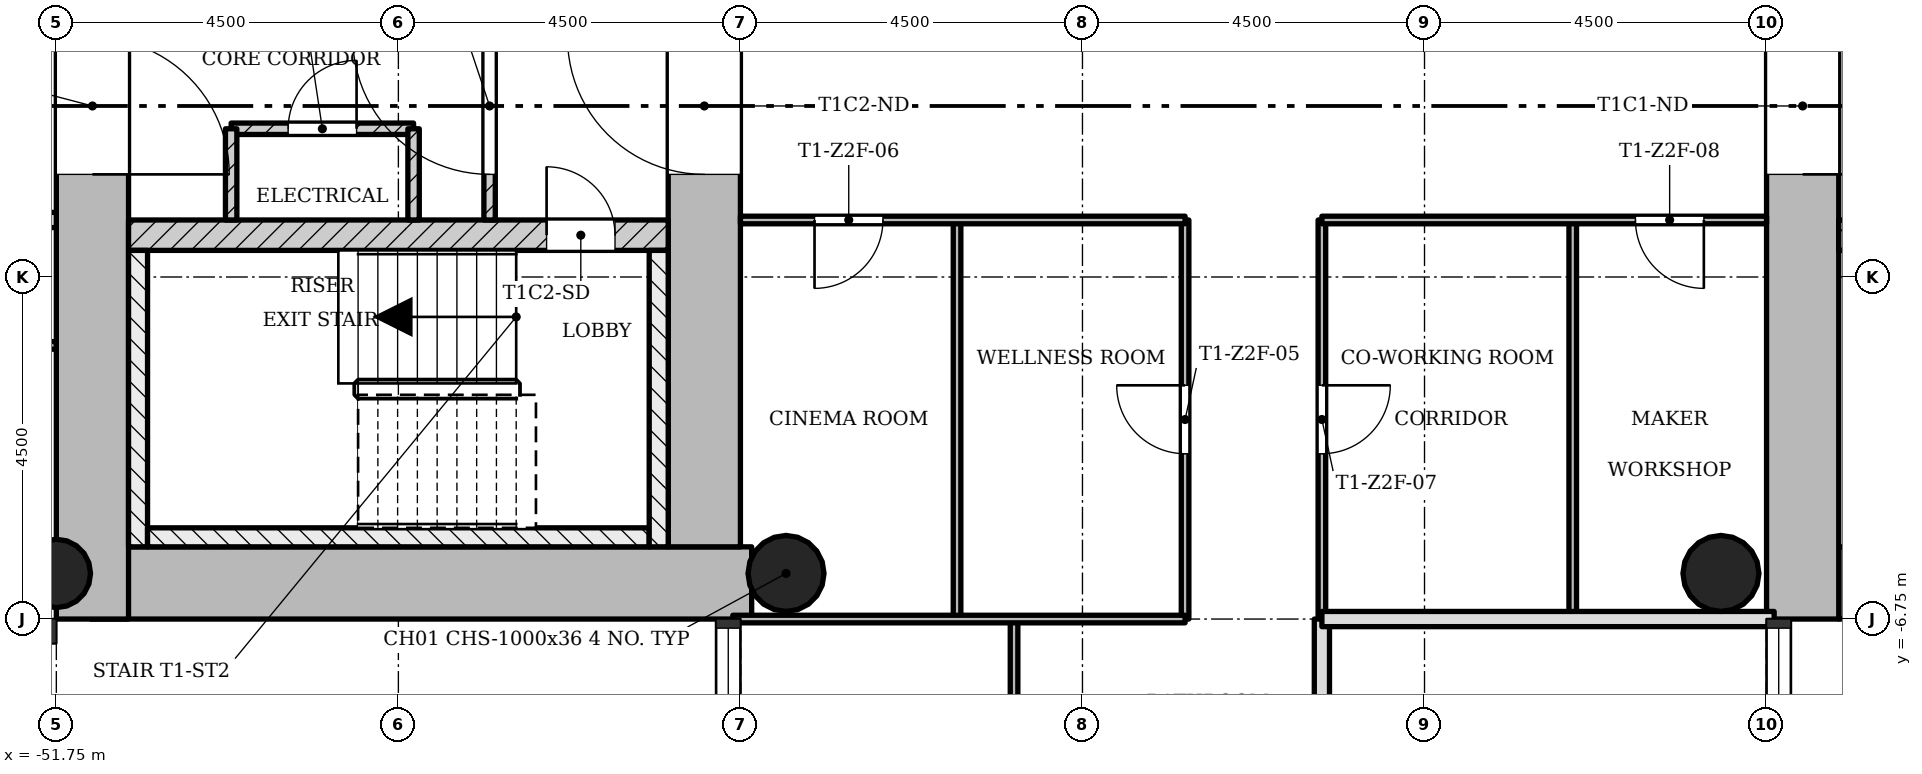
"""IFC4 building model, lengths in metres.
Left out: names, types, materials, properties, quantities, classifications, styles, units other than length and angle.
Written with IfcOpenShell. Run it as: python <this file> out.ifc"""

import sys

from ifc_helpers import new_model, si_unit, direction, frame, frame_2d, origin, origin_2d, place, context, subcontext, project, spatial, rectangle, hollow_circle, extrude, element, fill, save


model = new_model("IFC4")
c1 = context("Model", 3, precision=1e-05, world=origin(), true_north=direction((0.0, 1.0)))
c2 = subcontext(c1, "Body", "Model", "MODEL_VIEW")
j1 = project(units=[si_unit("LENGTHUNIT", "METRE"), si_unit("PLANEANGLEUNIT", "RADIAN")], contexts=[c1])
p1 = place(None, origin())
s1 = spatial("IfcSite", under=j1, at=p1, CompositionType="ELEMENT")
p2 = place(p1, origin())
s2 = spatial("IfcBuilding", under=s1, at=p2, CompositionType="ELEMENT")
p3 = place(p2, frame((0.0, 0.0, 114.0)))
s3 = spatial("IfcBuildingStorey", under=s2, at=p3, CompositionType="ELEMENT", Elevation=114.0)
p4 = place(p3, frame((-28.3, -6.275, 0.0), z_axis=(0.0, 0.0, 1.0), x_axis=(1.0, 0.0, 0.0)))
e1 = element("IfcWall", 1, at=p4, inside=s3, PredefinedType="SHEAR", context=c2, shape_type="SweptSolid", body=[
    extrude(rectangle(XDim=8.05, YDim=0.95, at=frame_2d((4.025, 0.0))), origin(), (0.0, 0.0, 1.0), 3.4),
])
p5 = place(p3, frame((-28.775, 5.8, 0.0), z_axis=(0.0, 0.0, 1.0), x_axis=(0.0, -1.0, 0.0)))
e2 = element("IfcWall", 2, at=p5, inside=s3, PredefinedType="SHEAR", context=c2, shape_type="SweptSolid", body=[
    extrude(rectangle(XDim=12.55, YDim=0.95, at=frame_2d((6.275, 0.0))), origin(), (0.0, 0.0, 1.0), 3.4),
])
p6 = place(p5, frame((4.9, 0.0, 0.0)))
e3 = element("IfcOpeningElement", 3, at=p6, cuts=e2, PredefinedType="OPENING", context=c2, shape_type="SweptSolid", body=[
    extrude(rectangle(XDim=1.8, YDim=2.1, at=frame_2d((0.9, 1.05))), frame((0.0, 0.485, 0.0), z_axis=(0.0, -1.0, 0.0), x_axis=(1.0, 0.0, 0.0)), (0.0, 0.0, 1.0), 0.97),
])
p7 = place(p3, frame((-28.3, -1.7, 0.0), z_axis=(0.0, 0.0, 1.0), x_axis=(1.0, 0.0, 0.0)))
e4 = element("IfcWall", 4, at=p7, inside=s3, PredefinedType="SHEAR", context=c2, shape_type="SweptSolid", body=[
    extrude(rectangle(XDim=7.1, YDim=0.4, at=frame_2d((3.55, 0.0))), origin(), (0.0, 0.0, 1.0), 3.4),
])
p8 = place(p7, frame((0.8, 0.0, 0.0)))
e5 = element("IfcOpeningElement", 5, at=p8, cuts=e4, PredefinedType="OPENING", context=c2, shape_type="SweptSolid", body=[
    extrude(rectangle(XDim=1.1, YDim=2.1, at=frame_2d((0.55, 1.05))), frame((0.0, 0.21, 0.0), z_axis=(0.0, -1.0, 0.0), x_axis=(1.0, 0.0, 0.0)), (0.0, 0.0, 1.0), 0.42),
])
p9 = place(p7, frame((3.0, 0.0, 0.0)))
e6 = element("IfcOpeningElement", 6, at=p9, cuts=e4, PredefinedType="OPENING", context=c2, shape_type="SweptSolid", body=[
    extrude(rectangle(XDim=1.1, YDim=2.1, at=frame_2d((0.55, 1.05))), frame((0.0, 0.21, 0.0), z_axis=(0.0, -1.0, 0.0), x_axis=(1.0, 0.0, 0.0)), (0.0, 0.0, 1.0), 0.42),
])
p10 = place(p7, frame((5.2, 0.0, 0.0)))
e7 = element("IfcOpeningElement", 7, at=p10, cuts=e4, PredefinedType="OPENING", context=c2, shape_type="SweptSolid", body=[
    extrude(rectangle(XDim=1.1, YDim=2.1, at=frame_2d((0.55, 1.05))), frame((0.0, 0.21, 0.0), z_axis=(0.0, -1.0, 0.0), x_axis=(1.0, 0.0, 0.0)), (0.0, 0.0, 1.0), 0.42),
])
p11 = place(p3, frame((-51.298, -6.275, 0.0), z_axis=(0.0, 0.0, 1.0), x_axis=(1.0, 0.0, 0.0)))
e8 = element("IfcWall", 8, at=p11, inside=s3, PredefinedType="SHEAR", context=c2, shape_type="SweptSolid", body=[
    extrude(rectangle(XDim=8.696, YDim=0.95, at=frame_2d((4.348, 0.0))), origin(), (0.0, 0.0, 1.0), 3.4),
])
p12 = place(p3, frame((-43.225, -5.8, 0.0), z_axis=(0.0, 0.0, 1.0), x_axis=(0.0, 1.0, 0.0)))
e9 = element("IfcWall", 9, at=p12, inside=s3, PredefinedType="SHEAR", context=c2, shape_type="SweptSolid", body=[
    extrude(rectangle(XDim=12.55, YDim=0.95, at=frame_2d((6.275, 0.0))), origin(), (0.0, 0.0, 1.0), 3.4),
])
p13 = place(p12, frame((4.9, 0.0, 0.0)))
e10 = element("IfcOpeningElement", 10, at=p13, cuts=e9, PredefinedType="OPENING", context=c2, shape_type="SweptSolid", body=[
    extrude(rectangle(XDim=1.8, YDim=2.1, at=frame_2d((0.9, 1.05))), frame((0.0, 0.485, 0.0), z_axis=(0.0, -1.0, 0.0), x_axis=(1.0, 0.0, 0.0)), (0.0, 0.0, 1.0), 0.97),
])
p14 = place(p3, frame((-51.275, 5.8, 0.0), z_axis=(0.0, 0.0, 1.0), x_axis=(0.0, -1.0, 0.0)))
e11 = element("IfcWall", 11, at=p14, inside=s3, PredefinedType="SHEAR", context=c2, shape_type="SweptSolid", body=[
    extrude(rectangle(XDim=12.55, YDim=0.95, at=frame_2d((6.275, 0.0))), origin(), (0.0, 0.0, 1.0), 3.4),
])
p15 = place(p14, frame((4.9, 0.0, 0.0)))
e12 = element("IfcOpeningElement", 12, at=p15, cuts=e11, PredefinedType="OPENING", context=c2, shape_type="SweptSolid", body=[
    extrude(rectangle(XDim=1.8, YDim=2.1, at=frame_2d((0.9, 1.05))), frame((0.0, 0.485, 0.0), z_axis=(0.0, -1.0, 0.0), x_axis=(1.0, 0.0, 0.0)), (0.0, 0.0, 1.0), 0.97),
])
p16 = place(p3, frame((-50.8, -1.7, 0.0), z_axis=(0.0, 0.0, 1.0), x_axis=(1.0, 0.0, 0.0)))
e13 = element("IfcWall", 13, at=p16, inside=s3, PredefinedType="SHEAR", context=c2, shape_type="SweptSolid", body=[
    extrude(rectangle(XDim=7.1, YDim=0.4, at=frame_2d((3.55, 0.0))), origin(), (0.0, 0.0, 1.0), 3.4),
])
p17 = place(p16, frame((5.5, 0.0, 0.0)))
e14 = element("IfcOpeningElement", 14, at=p17, cuts=e13, PredefinedType="OPENING", context=c2, shape_type="SweptSolid", body=[
    extrude(rectangle(XDim=0.9, YDim=2.1, at=frame_2d((0.45, 1.05))), frame((0.0, 0.21, 0.0), z_axis=(0.0, -1.0, 0.0), x_axis=(1.0, 0.0, 0.0)), (0.0, 0.0, 1.0), 0.42),
])
p18 = place(p3, frame((-51.75, -6.15, 0.0), z_axis=(0.0, 0.0, 1.0), x_axis=(1.0, 0.0, 0.0)))
e15 = element("IfcColumn", 15, at=p18, inside=s3, PredefinedType="COLUMN", context=c2, shape_type="SweptSolid", body=[
    extrude(hollow_circle(Radius=0.45, WallThickness=0.032, at=origin_2d()), origin(), (0.0, 0.0, 1.0), 3.4),
])
for number, where, z_axis, x_axis in (
    (16, (-42.15, -6.15, 0.0), (0.0, 0.0, 1.0), (1.0, 0.0, 0.0)),
    (17, (-29.85, -6.15, 0.0), (0.0, 0.0, 1.0), (1.0, 0.0, 0.0)),
):
    element("IfcColumn", number, at=place(p3, frame(where, z_axis=z_axis, x_axis=x_axis)), inside=s3, PredefinedType="COLUMN", context=c2, shape_type="SweptSolid", body=[
        extrude(hollow_circle(Radius=0.5, WallThickness=0.036, at=origin_2d()), origin(), (0.0, 0.0, 1.0), 3.4),
    ])
p19 = place(p3, frame((-46.05, 1.5, 0.0), z_axis=(0.0, 0.0, 1.0), x_axis=(0.0, -1.0, 0.0)))
e18 = element("IfcWall", 18, at=p19, inside=s3, PredefinedType="PARTITIONING", context=c2, shape_type="SweptSolid", body=[
    extrude(rectangle(XDim=3.0, YDim=0.15, at=frame_2d((1.5, 0.0))), origin(), (0.0, 0.0, 1.0), 3.0),
])
p20 = place(p19, frame((0.6, 0.0, 0.0)))
e19 = element("IfcOpeningElement", 19, at=p20, cuts=e18, PredefinedType="OPENING", context=c2, shape_type="SweptSolid", body=[
    extrude(rectangle(XDim=1.8, YDim=2.1, at=frame_2d((0.9, 1.05))), frame((0.0, 0.085, 0.0), z_axis=(0.0, -1.0, 0.0), x_axis=(1.0, 0.0, 0.0)), (0.0, 0.0, 1.0), 0.17),
])
p21 = place(p3, frame((-47.05, -0.3, 0.0), z_axis=(0.0, 0.0, 1.0), x_axis=(-1.0, 0.0, 0.0)))
e20 = element("IfcWall", 20, at=p21, inside=s3, PredefinedType="PARTITIONING", context=c2, shape_type="SweptSolid", body=[
    extrude(rectangle(XDim=2.4, YDim=0.15, at=frame_2d((1.2, 0.0))), origin(), (0.0, 0.0, 1.0), 3.0),
])
p22 = place(p21, frame((0.75, 0.0, 0.0)))
e21 = element("IfcOpeningElement", 21, at=p22, cuts=e20, PredefinedType="OPENING", context=c2, shape_type="SweptSolid", body=[
    extrude(rectangle(XDim=0.9, YDim=2.1, at=frame_2d((0.45, 1.05))), frame((0.0, 0.085, 0.0), z_axis=(0.0, -1.0, 0.0), x_axis=(1.0, 0.0, 0.0)), (0.0, 0.0, 1.0), 0.17),
])
for number, where, z_axis, x_axis in (
    (22, (-47.05, -0.3, 0.0), (0.0, 0.0, 1.0), (0.0, -1.0, 0.0)),
    (23, (-49.45, -0.3, 0.0), (0.0, 0.0, 1.0), (0.0, -1.0, 0.0)),
):
    element("IfcWall", number, at=place(p3, frame(where, z_axis=z_axis, x_axis=x_axis)), inside=s3, PredefinedType="PARTITIONING", context=c2, shape_type="SweptSolid", body=[
        extrude(rectangle(XDim=1.2, YDim=0.15, at=frame_2d((0.6, 0.0))), origin(), (0.0, 0.0, 1.0), 3.0),
    ])
p23 = place(p3, frame((-39.9, -6.75, 0.0), z_axis=(0.0, 0.0, 1.0), x_axis=(0.0, 1.0, 0.0)))
e24 = element("IfcWall", 24, at=p23, inside=s3, PredefinedType="PARTITIONING", context=c2, shape_type="SweptSolid", body=[
    extrude(rectangle(XDim=5.25, YDim=0.1, at=frame_2d((2.625, 0.0))), origin(), (0.0, 0.0, 1.0), 3.0),
])
p24 = place(p3, frame((-39.15, -15.75, 0.0), z_axis=(0.0, 0.0, 1.0), x_axis=(0.0, 1.0, 0.0)))
e25 = element("IfcWall", 25, at=p24, inside=s3, PredefinedType="PARTITIONING", context=c2, shape_type="SweptSolid", body=[
    extrude(rectangle(XDim=9.0, YDim=0.1, at=frame_2d((4.5, 0.0))), origin(), (0.0, 0.0, 1.0), 3.0),
])
p25 = place(p24, frame((5.55, 0.0, 0.0)))
e26 = element("IfcOpeningElement", 26, at=p25, cuts=e25, PredefinedType="OPENING", context=c2, shape_type="SweptSolid", body=[
    extrude(rectangle(XDim=0.9, YDim=2.1, at=frame_2d((0.45, 1.05))), frame((0.0, 0.06, 0.0), z_axis=(0.0, -1.0, 0.0), x_axis=(1.0, 0.0, 0.0)), (0.0, 0.0, 1.0), 0.12),
])
p26 = place(p3, frame((-36.9, -6.75, 0.0), z_axis=(0.0, 0.0, 1.0), x_axis=(0.0, 1.0, 0.0)))
e27 = element("IfcWall", 27, at=p26, inside=s3, PredefinedType="PARTITIONING", context=c2, shape_type="SweptSolid", body=[
    extrude(rectangle(XDim=5.25, YDim=0.1, at=frame_2d((2.625, 0.0))), origin(), (0.0, 0.0, 1.0), 3.0),
])
p27 = place(p26, frame((2.175, 0.0, 0.0)))
e28 = element("IfcOpeningElement", 28, at=p27, cuts=e27, PredefinedType="OPENING", context=c2, shape_type="SweptSolid", body=[
    extrude(rectangle(XDim=0.9, YDim=2.1, at=frame_2d((0.45, 1.05))), frame((0.0, 0.06, 0.0), z_axis=(0.0, -1.0, 0.0), x_axis=(1.0, 0.0, 0.0)), (0.0, 0.0, 1.0), 0.12),
])
p28 = place(p3, frame((-35.1, -6.75, 0.0), z_axis=(0.0, 0.0, 1.0), x_axis=(0.0, 1.0, 0.0)))
e29 = element("IfcWall", 29, at=p28, inside=s3, PredefinedType="PARTITIONING", context=c2, shape_type="SweptSolid", body=[
    extrude(rectangle(XDim=5.25, YDim=0.1, at=frame_2d((2.625, 0.0))), origin(), (0.0, 0.0, 1.0), 3.0),
])
p29 = place(p28, frame((2.175, 0.0, 0.0)))
e30 = element("IfcOpeningElement", 30, at=p29, cuts=e29, PredefinedType="OPENING", context=c2, shape_type="SweptSolid", body=[
    extrude(rectangle(XDim=0.9, YDim=2.1, at=frame_2d((0.45, 1.05))), frame((0.0, 0.06, 0.0), z_axis=(0.0, -1.0, 0.0), x_axis=(1.0, 0.0, 0.0)), (0.0, 0.0, 1.0), 0.12),
])
p30 = place(p3, frame((-35.1, -8.55, 0.0), z_axis=(0.0, 0.0, 1.0), x_axis=(0.0, 1.0, 0.0)))
e31 = element("IfcWall", 31, at=p30, inside=s3, PredefinedType="SOLIDWALL", context=c2, shape_type="SweptSolid", body=[
    extrude(rectangle(XDim=1.8, YDim=0.2, at=frame_2d((0.9, 0.0))), origin(), (0.0, 0.0, 1.0), 3.0),
])
p31 = place(p3, frame((-31.8, -6.75, 0.0), z_axis=(0.0, 0.0, 1.0), x_axis=(0.0, 1.0, 0.0)))
e32 = element("IfcWall", 32, at=p31, inside=s3, PredefinedType="PARTITIONING", context=c2, shape_type="SweptSolid", body=[
    extrude(rectangle(XDim=5.25, YDim=0.1, at=frame_2d((2.625, 0.0))), origin(), (0.0, 0.0, 1.0), 3.0),
])
p32 = place(p3, frame((-42.85, -6.75, 0.0), z_axis=(0.0, 0.0, 1.0), x_axis=(1.0, 0.0, 0.0)))
e33 = element("IfcWall", 33, at=p32, inside=s3, PredefinedType="PARTITIONING", context=c2, shape_type="SweptSolid", body=[
    extrude(rectangle(XDim=5.95, YDim=0.1, at=frame_2d((2.975, 0.0))), origin(), (0.0, 0.0, 1.0), 3.0),
])
p33 = place(p3, frame((-35.1, -6.75, 0.0), z_axis=(0.0, 0.0, 1.0), x_axis=(1.0, 0.0, 0.0)))
e34 = element("IfcWall", 34, at=p33, inside=s3, PredefinedType="SOLIDWALL", context=c2, shape_type="SweptSolid", body=[
    extrude(rectangle(XDim=5.95, YDim=0.2, at=frame_2d((2.975, 0.0))), origin(), (0.0, 0.0, 1.0), 3.0),
])
p34 = place(p3, frame((-56.25, -3.15, 0.0), z_axis=(0.0, 0.0, 1.0), x_axis=(1.0, 0.0, 0.0)))
e35 = element("IfcWall", 35, at=p34, inside=s3, PredefinedType="PARTITIONING", context=c2, shape_type="SweptSolid", body=[
    extrude(rectangle(XDim=4.5, YDim=0.1, at=frame_2d((2.25, 0.0))), origin(), (0.0, 0.0, 1.0), 3.0),
])
p35 = place(p34, frame((0.6, 0.0, 0.0)))
e36 = element("IfcOpeningElement", 36, at=p35, cuts=e35, PredefinedType="OPENING", context=c2, shape_type="SweptSolid", body=[
    extrude(rectangle(XDim=0.9, YDim=2.1, at=frame_2d((0.45, 1.05))), frame((0.0, 0.06, 0.0), z_axis=(0.0, -1.0, 0.0), x_axis=(1.0, 0.0, 0.0)), (0.0, 0.0, 1.0), 0.12),
])
p36 = place(p3, frame((-42.75, -1.5, 0.0), z_axis=(0.0, 0.0, 1.0), x_axis=(1.0, 0.0, 0.0)))
e37 = element("IfcWall", 37, at=p36, inside=s3, PredefinedType="PARTITIONING", context=c2, shape_type="SweptSolid", body=[
    extrude(rectangle(XDim=5.85, YDim=0.1, at=frame_2d((2.925, 0.0))), origin(), (0.0, 0.0, 1.0), 3.0),
])
p37 = place(p36, frame((0.975, 0.0, 0.0)))
e38 = element("IfcOpeningElement", 38, at=p37, cuts=e37, PredefinedType="OPENING", context=c2, shape_type="SweptSolid", body=[
    extrude(rectangle(XDim=0.9, YDim=2.1, at=frame_2d((0.45, 1.05))), frame((0.0, 0.06, 0.0), z_axis=(0.0, -1.0, 0.0), x_axis=(1.0, 0.0, 0.0)), (0.0, 0.0, 1.0), 0.12),
])
p38 = place(p3, frame((-35.1, -1.5, 0.0), z_axis=(0.0, 0.0, 1.0), x_axis=(1.0, 0.0, 0.0)))
e39 = element("IfcWall", 39, at=p38, inside=s3, PredefinedType="PARTITIONING", context=c2, shape_type="SweptSolid", body=[
    extrude(rectangle(XDim=5.85, YDim=0.1, at=frame_2d((2.925, 0.0))), origin(), (0.0, 0.0, 1.0), 3.0),
])
p39 = place(p38, frame((4.125, 0.0, 0.0)))
e40 = element("IfcOpeningElement", 40, at=p39, cuts=e39, PredefinedType="OPENING", context=c2, shape_type="SweptSolid", body=[
    extrude(rectangle(XDim=0.9, YDim=2.1, at=frame_2d((0.45, 1.05))), frame((0.0, 0.06, 0.0), z_axis=(0.0, -1.0, 0.0), x_axis=(1.0, 0.0, 0.0)), (0.0, 0.0, 1.0), 0.12),
])
p40 = place(p3, frame((-56.25, -1.5, 0.0), z_axis=(0.0, 0.0, 1.0), x_axis=(1.0, 0.0, 0.0)))
e41 = element("IfcWall", 41, at=p40, inside=s3, PredefinedType="SOLIDWALL", context=c2, shape_type="SweptSolid", body=[
    extrude(rectangle(XDim=4.5, YDim=0.2, at=frame_2d((2.25, 0.0))), origin(), (0.0, 0.0, 1.0), 3.0),
])
p41 = place(p40, frame((0.6, 0.0, 0.0)))
e42 = element("IfcOpeningElement", 42, at=p41, cuts=e41, PredefinedType="OPENING", context=c2, shape_type="SweptSolid", body=[
    extrude(rectangle(XDim=0.9, YDim=2.1, at=frame_2d((0.45, 1.05))), frame((0.0, 0.11, 0.0), z_axis=(0.0, -1.0, 0.0), x_axis=(1.0, 0.0, 0.0)), (0.0, 0.0, 1.0), 0.22),
])
p42 = place(p3, frame((-50.675, -1.9, 0.0), z_axis=(0.0, 0.0, 1.0), x_axis=(0.0, -1.0, 0.0)))
e43 = element("IfcWall", 43, at=p42, inside=s3, PredefinedType="SHEAR", context=c2, shape_type="SweptSolid", body=[
    extrude(rectangle(XDim=3.9, YDim=0.25, at=frame_2d((1.95, 0.0))), origin(), (0.0, 0.0, 1.0), 3.4),
])
p43 = place(p3, frame((-43.95, -5.675, 0.0), z_axis=(0.0, 0.0, 1.0), x_axis=(-1.0, 0.0, 0.0)))
e44 = element("IfcWall", 44, at=p43, inside=s3, PredefinedType="SHEAR", context=c2, shape_type="SweptSolid", body=[
    extrude(rectangle(XDim=6.6, YDim=0.25, at=frame_2d((3.3, 0.0))), origin(), (0.0, 0.0, 1.0), 3.4),
])
p44 = place(p3, frame((-43.825, -1.9, 0.0), z_axis=(0.0, 0.0, 1.0), x_axis=(0.0, -1.0, 0.0)))
e45 = element("IfcWall", 45, at=p44, inside=s3, PredefinedType="SHEAR", context=c2, shape_type="SweptSolid", body=[
    extrude(rectangle(XDim=3.9, YDim=0.25, at=frame_2d((1.95, 0.0))), origin(), (0.0, 0.0, 1.0), 3.4),
])
p45 = place(p20, origin())
e46 = element("IfcDoor", 46, at=p45, inside=s3, OperationType="SINGLE_SWING_LEFT", PredefinedType="DOOR", context=c2, shape_type="SweptSolid", body=[
    extrude(rectangle(XDim=1.8, YDim=2.1, at=frame_2d((0.9, 1.05))), frame((0.0, 0.025, 0.0), z_axis=(0.0, -1.0, 0.0), x_axis=(1.0, 0.0, 0.0)), (0.0, 0.0, 1.0), 0.05),
])
fill(e19, e46)
p46 = place(p22, origin())
e47 = element("IfcDoor", 47, at=p46, inside=s3, OperationType="SINGLE_SWING_LEFT", PredefinedType="DOOR", context=c2, shape_type="SweptSolid", body=[
    extrude(rectangle(XDim=0.9, YDim=2.1, at=frame_2d((0.45, 1.05))), frame((0.0, 0.025, 0.0), z_axis=(0.0, -1.0, 0.0), x_axis=(1.0, 0.0, 0.0)), (0.0, 0.0, 1.0), 0.05),
])
fill(e21, e47)
p47 = place(p27, origin())
e48 = element("IfcDoor", 48, at=p47, inside=s3, OperationType="SINGLE_SWING_LEFT", PredefinedType="DOOR", context=c2, shape_type="SweptSolid", body=[
    extrude(rectangle(XDim=0.9, YDim=2.1, at=frame_2d((0.45, 1.05))), frame((0.0, 0.025, 0.0), z_axis=(0.0, -1.0, 0.0), x_axis=(1.0, 0.0, 0.0)), (0.0, 0.0, 1.0), 0.05),
])
fill(e28, e48)
p48 = place(p37, origin())
e49 = element("IfcDoor", 49, at=p48, inside=s3, OperationType="SINGLE_SWING_LEFT", PredefinedType="DOOR", context=c2, shape_type="SweptSolid", body=[
    extrude(rectangle(XDim=0.9, YDim=2.1, at=frame_2d((0.45, 1.05))), frame((0.0, 0.025, 0.0), z_axis=(0.0, -1.0, 0.0), x_axis=(1.0, 0.0, 0.0)), (0.0, 0.0, 1.0), 0.05),
])
fill(e38, e49)
p49 = place(p29, origin())
e50 = element("IfcDoor", 50, at=p49, inside=s3, OperationType="SINGLE_SWING_RIGHT", PredefinedType="DOOR", context=c2, shape_type="SweptSolid", body=[
    extrude(rectangle(XDim=0.9, YDim=2.1, at=frame_2d((0.45, 1.05))), frame((0.0, 0.025, 0.0), z_axis=(0.0, -1.0, 0.0), x_axis=(1.0, 0.0, 0.0)), (0.0, 0.0, 1.0), 0.05),
])
fill(e30, e50)
p50 = place(p39, origin())
e51 = element("IfcDoor", 51, at=p50, inside=s3, OperationType="SINGLE_SWING_RIGHT", PredefinedType="DOOR", context=c2, shape_type="SweptSolid", body=[
    extrude(rectangle(XDim=0.9, YDim=2.1, at=frame_2d((0.45, 1.05))), frame((0.0, 0.025, 0.0), z_axis=(0.0, -1.0, 0.0), x_axis=(1.0, 0.0, 0.0)), (0.0, 0.0, 1.0), 0.05),
])
fill(e40, e51)
p51 = place(p6, origin())
e52 = element("IfcDoor", 52, at=p51, inside=s3, OperationType="SINGLE_SWING_LEFT", PredefinedType="DOOR", context=c2, shape_type="SweptSolid", body=[
    extrude(rectangle(XDim=1.8, YDim=2.1, at=frame_2d((0.9, 1.05))), frame((0.0, 0.025, 0.0), z_axis=(0.0, -1.0, 0.0), x_axis=(1.0, 0.0, 0.0)), (0.0, 0.0, 1.0), 0.05),
])
fill(e3, e52)
p52 = place(p17, origin())
e53 = element("IfcDoor", 53, at=p52, inside=s3, OperationType="SINGLE_SWING_RIGHT", PredefinedType="DOOR", context=c2, shape_type="SweptSolid", body=[
    extrude(rectangle(XDim=0.9, YDim=2.1, at=frame_2d((0.45, 1.05))), frame((0.0, 0.025, 0.0), z_axis=(0.0, -1.0, 0.0), x_axis=(1.0, 0.0, 0.0)), (0.0, 0.0, 1.0), 0.05),
])
fill(e14, e53)
p53 = place(p13, origin())
e54 = element("IfcDoor", 54, at=p53, inside=s3, OperationType="SINGLE_SWING_LEFT", PredefinedType="DOOR", context=c2, shape_type="SweptSolid", body=[
    extrude(rectangle(XDim=1.8, YDim=2.1, at=frame_2d((0.9, 1.05))), frame((0.0, 0.025, 0.0), z_axis=(0.0, -1.0, 0.0), x_axis=(1.0, 0.0, 0.0)), (0.0, 0.0, 1.0), 0.05),
])
fill(e10, e54)
p54 = place(p15, origin())
e55 = element("IfcDoor", 55, at=p54, inside=s3, OperationType="SINGLE_SWING_LEFT", PredefinedType="DOOR", context=c2, shape_type="SweptSolid", body=[
    extrude(rectangle(XDim=1.8, YDim=2.1, at=frame_2d((0.9, 1.05))), frame((0.0, 0.025, 0.0), z_axis=(0.0, -1.0, 0.0), x_axis=(1.0, 0.0, 0.0)), (0.0, 0.0, 1.0), 0.05),
])
fill(e12, e55)
save(model, sys.argv[1])
